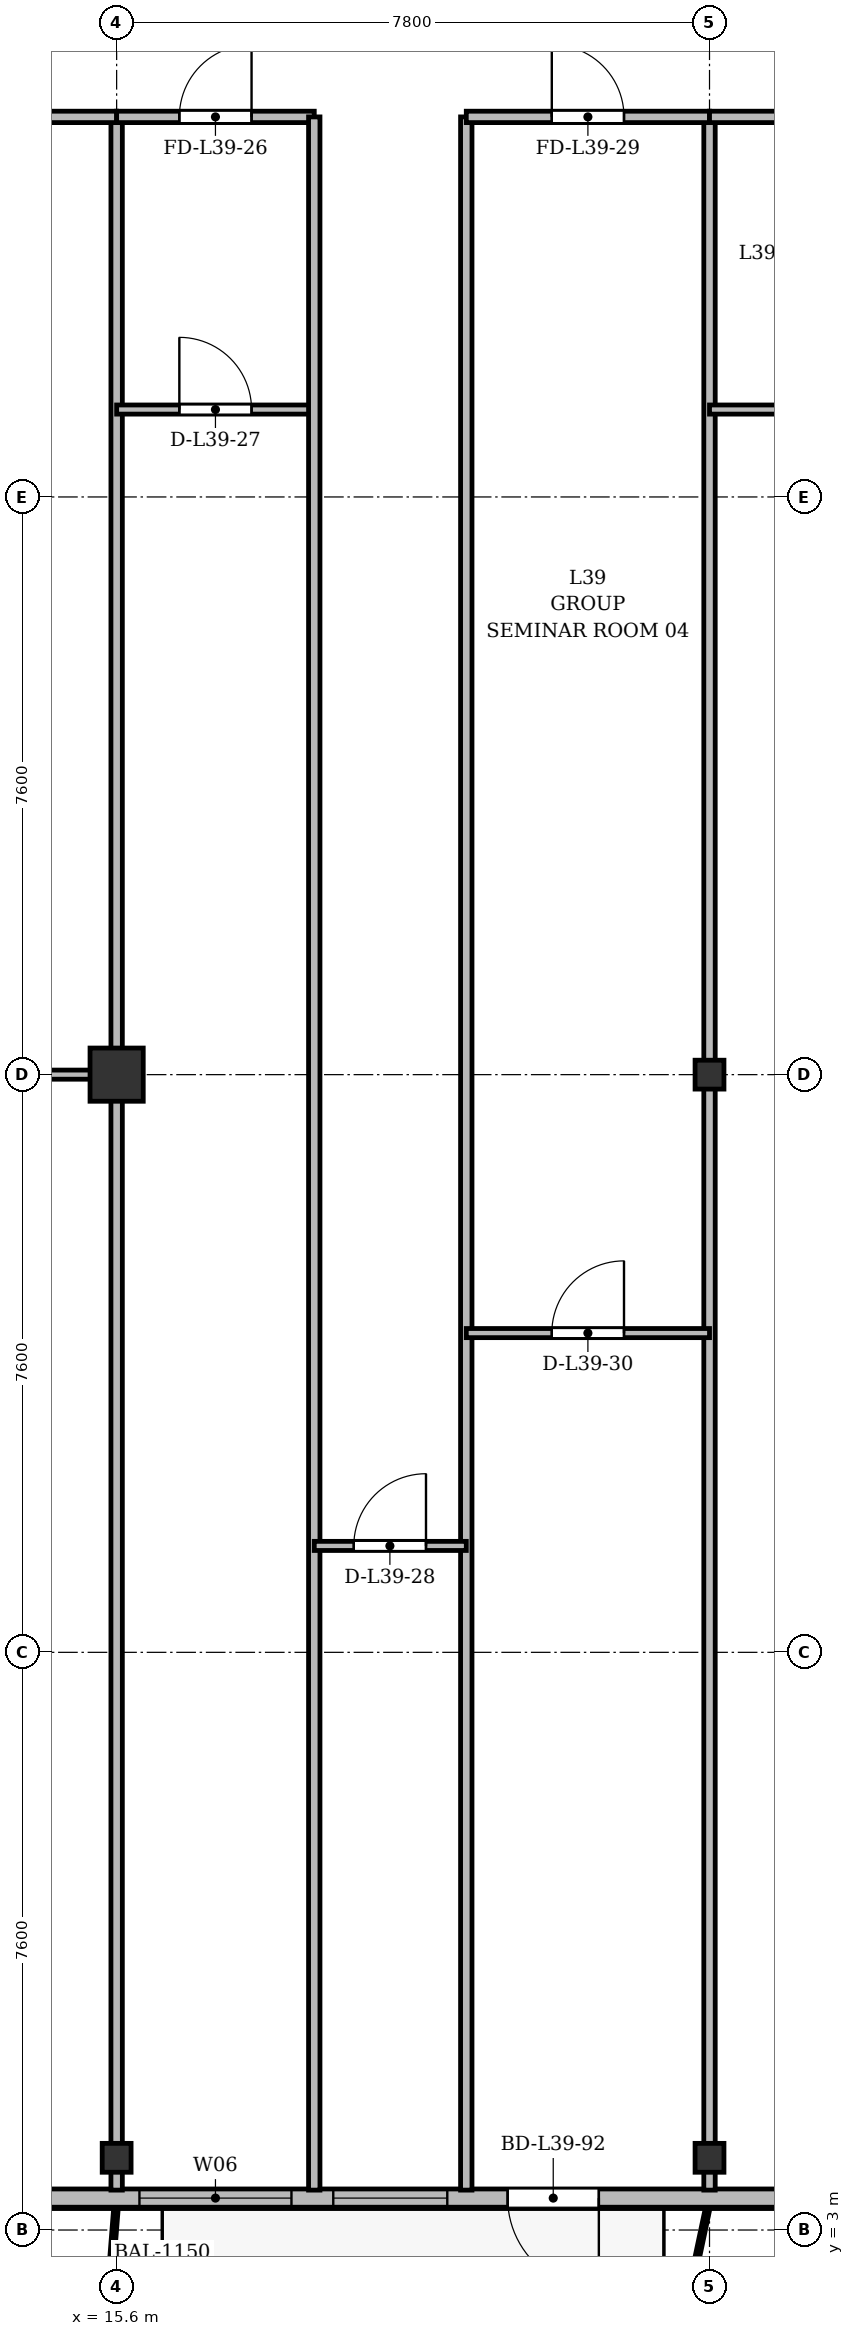
"""IFC4 building model, lengths in metres.
Left out: names, types, materials, properties, quantities, classifications, styles, units other than length and angle.
Written with IfcOpenShell. Run it as: python <this file> out.ifc"""

import sys

from ifc_helpers import new_model, si_unit, direction, frame, frame_2d, origin, origin_2d, place, context, subcontext, project, spatial, rectangle, i_section, extrude, source, transform, mapped, element, fill, save


model = new_model("IFC4")
c1 = context("Model", 3, precision=1e-05, world=origin(), true_north=direction((0.0, 1.0)))
c2 = subcontext(c1, "Body", "Model", "MODEL_VIEW")
j1 = project(units=[si_unit("LENGTHUNIT", "METRE"), si_unit("PLANEANGLEUNIT", "RADIAN")], contexts=[c1])
p1 = place(None, origin())
s1 = spatial("IfcSite", under=j1, at=p1, CompositionType="ELEMENT")
p2 = place(p1, origin())
s2 = spatial("IfcBuilding", under=s1, at=p2, CompositionType="ELEMENT")
p3 = place(p2, frame((0.0, 0.0, 150.1)))
s3 = spatial("IfcBuildingStorey", under=s2, at=p3, CompositionType="ELEMENT", Elevation=150.1)
m1 = source(origin(), c2, "Body", "SweptSolid", [
    extrude(i_section(OverallWidth=0.38, OverallDepth=0.38, WebThickness=0.02, FlangeThickness=0.03, at=origin_2d()), origin(), (0.0, 0.0, 1.0), 3.6),
])
p4 = place(p3, frame((15.6, 3.95, 0.0), z_axis=(0.0, 0.0, 1.0), x_axis=(1.0, 0.0, 0.0)))
e1 = element("IfcColumn", 1, at=p4, inside=s3, PredefinedType="COLUMN", context=c2, shape_type="MappedRepresentation", body=[
    mapped(m1, transform((0.0, 0.0, 0.0), x_axis=(1.0, 0.0, 0.0), y_axis=(0.0, 1.0, 0.0), z_axis=(0.0, 0.0, 1.0), scale=1.0)),
])
m2 = source(origin(), c2, "Body", "SweptSolid", [
    extrude(rectangle(XDim=0.7, YDim=0.7, at=origin_2d()), origin(), (0.0, 0.0, 1.0), 3.6),
])
p5 = place(p3, frame((15.6, 18.2, 0.0), z_axis=(0.0, 0.0, 1.0), x_axis=(1.0, 0.0, 0.0)))
e2 = element("IfcColumn", 2, at=p5, inside=s3, PredefinedType="COLUMN", context=c2, shape_type="MappedRepresentation", body=[
    mapped(m2, transform((0.0, 0.0, 0.0), x_axis=(1.0, 0.0, 0.0), y_axis=(0.0, 1.0, 0.0), z_axis=(0.0, 0.0, 1.0), scale=1.0)),
])
for number, where, z_axis, x_axis in (
    (3, (23.4, 3.95, 0.0), (0.0, 0.0, 1.0), (1.0, 0.0, 0.0)),
    (4, (23.4, 18.2, 0.0), (0.0, 0.0, 1.0), (1.0, 0.0, 0.0)),
):
    element("IfcColumn", number, at=place(p3, frame(where, z_axis=z_axis, x_axis=x_axis)), inside=s3, PredefinedType="COLUMN", context=c2, shape_type="MappedRepresentation", body=[
        mapped(m1, transform((0.0, 0.0, 0.0), x_axis=(1.0, 0.0, 0.0), y_axis=(0.0, 1.0, 0.0), z_axis=(0.0, 0.0, 1.0), scale=1.0)),
    ])
p6 = place(p3, frame((63.6, 3.42, 0.0), z_axis=(0.0, 0.0, 1.0), x_axis=(-1.0, 0.0, 0.0)))
e5 = element("IfcWall", 5, at=p6, inside=s3, PredefinedType="SOLIDWALL", context=c2, shape_type="SweptSolid", body=[
    extrude(rectangle(XDim=52.8, YDim=0.24, at=frame_2d((26.4, 0.0))), origin(), (0.0, 0.0, 1.0), 3.35),
])
p7 = place(p6, frame((1.62, 0.0, 0.9)))
e6 = element("IfcOpeningElement", 6, at=p7, cuts=e5, PredefinedType="OPENING", context=c2, shape_type="SweptSolid", body=[
    extrude(rectangle(XDim=1.65, YDim=1.85, at=frame_2d((0.825, 0.925))), frame((0.0, 0.13, 0.0), z_axis=(0.0, -1.0, 0.0), x_axis=(1.0, 0.0, 0.0)), (0.0, 0.0, 1.0), 0.26),
])
p8 = place(p6, frame((5.2, 0.0, 0.9)))
e7 = element("IfcOpeningElement", 7, at=p8, cuts=e5, PredefinedType="OPENING", context=c2, shape_type="SweptSolid", body=[
    extrude(rectangle(XDim=1.8, YDim=1.8, at=frame_2d((0.9, 0.9))), frame((0.0, 0.13, 0.0), z_axis=(0.0, -1.0, 0.0), x_axis=(1.0, 0.0, 0.0)), (0.0, 0.0, 1.0), 0.26),
])
p9 = place(p6, frame((7.65, 0.0, 0.9)))
e8 = element("IfcOpeningElement", 8, at=p9, cuts=e5, PredefinedType="OPENING", context=c2, shape_type="SweptSolid", body=[
    extrude(rectangle(XDim=1.5, YDim=1.75, at=frame_2d((0.75, 0.875))), frame((0.0, 0.13, 0.0), z_axis=(0.0, -1.0, 0.0), x_axis=(1.0, 0.0, 0.0)), (0.0, 0.0, 1.0), 0.26),
])
p10 = place(p6, frame((10.25, 0.0, 0.9)))
e9 = element("IfcOpeningElement", 9, at=p10, cuts=e5, PredefinedType="OPENING", context=c2, shape_type="SweptSolid", body=[
    extrude(rectangle(XDim=1.5, YDim=1.75, at=frame_2d((0.75, 0.875))), frame((0.0, 0.13, 0.0), z_axis=(0.0, -1.0, 0.0), x_axis=(1.0, 0.0, 0.0)), (0.0, 0.0, 1.0), 0.26),
])
p11 = place(p6, frame((14.417, 0.0, 0.0)))
e10 = element("IfcOpeningElement", 10, at=p11, cuts=e5, PredefinedType="OPENING", context=c2, shape_type="SweptSolid", body=[
    extrude(rectangle(XDim=1.2, YDim=2.2, at=frame_2d((0.6, 1.1))), frame((0.0, 0.13, 0.0), z_axis=(0.0, -1.0, 0.0), x_axis=(1.0, 0.0, 0.0)), (0.0, 0.0, 1.0), 0.26),
])
p12 = place(p6, frame((25.575, 0.0, 0.9)))
e11 = element("IfcOpeningElement", 11, at=p12, cuts=e5, PredefinedType="OPENING", context=c2, shape_type="SweptSolid", body=[
    extrude(rectangle(XDim=1.65, YDim=1.85, at=frame_2d((0.825, 0.925))), frame((0.0, 0.13, 0.0), z_axis=(0.0, -1.0, 0.0), x_axis=(1.0, 0.0, 0.0)), (0.0, 0.0, 1.0), 0.26),
])
p13 = place(p6, frame((35.7, 0.0, 0.9)))
e12 = element("IfcOpeningElement", 12, at=p13, cuts=e5, PredefinedType="OPENING", context=c2, shape_type="SweptSolid", body=[
    extrude(rectangle(XDim=1.8, YDim=1.8, at=frame_2d((0.9, 0.9))), frame((0.0, 0.13, 0.0), z_axis=(0.0, -1.0, 0.0), x_axis=(1.0, 0.0, 0.0)), (0.0, 0.0, 1.0), 0.26),
])
p14 = place(p6, frame((41.656, 0.0, 0.0)))
e13 = element("IfcOpeningElement", 13, at=p14, cuts=e5, PredefinedType="OPENING", context=c2, shape_type="SweptSolid", body=[
    extrude(rectangle(XDim=1.2, YDim=2.2, at=frame_2d((0.6, 1.1))), frame((0.0, 0.13, 0.0), z_axis=(0.0, -1.0, 0.0), x_axis=(1.0, 0.0, 0.0)), (0.0, 0.0, 1.0), 0.26),
])
p15 = place(p6, frame((43.65, 0.0, 0.9)))
e14 = element("IfcOpeningElement", 14, at=p15, cuts=e5, PredefinedType="OPENING", context=c2, shape_type="SweptSolid", body=[
    extrude(rectangle(XDim=1.5, YDim=1.75, at=frame_2d((0.75, 0.875))), frame((0.0, 0.13, 0.0), z_axis=(0.0, -1.0, 0.0), x_axis=(1.0, 0.0, 0.0)), (0.0, 0.0, 1.0), 0.26),
])
p16 = place(p6, frame((45.7, 0.0, 0.9)))
e15 = element("IfcOpeningElement", 15, at=p16, cuts=e5, PredefinedType="OPENING", context=c2, shape_type="SweptSolid", body=[
    extrude(rectangle(XDim=2.0, YDim=1.95, at=frame_2d((1.0, 0.975))), frame((0.0, 0.13, 0.0), z_axis=(0.0, -1.0, 0.0), x_axis=(1.0, 0.0, 0.0)), (0.0, 0.0, 1.0), 0.26),
])
p17 = place(p6, frame((49.53, 0.0, 0.9)))
e16 = element("IfcOpeningElement", 16, at=p17, cuts=e5, PredefinedType="OPENING", context=c2, shape_type="SweptSolid", body=[
    extrude(rectangle(XDim=1.65, YDim=1.85, at=frame_2d((0.825, 0.925))), frame((0.0, 0.13, 0.0), z_axis=(0.0, -1.0, 0.0), x_axis=(1.0, 0.0, 0.0)), (0.0, 0.0, 1.0), 0.26),
])
for number, where, z_axis, x_axis in (
    (17, (15.6, 3.525, 0.0), (0.0, 0.0, 1.0), (0.0, 1.0, 0.0)),
    (18, (23.4, 3.525, 0.0), (0.0, 0.0, 1.0), (0.0, 1.0, 0.0)),
):
    element("IfcWall", number, at=place(p3, frame(where, z_axis=z_axis, x_axis=x_axis)), inside=s3, PredefinedType="PARTITIONING", context=c2, shape_type="SweptSolid", body=[
        extrude(rectangle(XDim=27.275, YDim=0.15, at=frame_2d((13.638, 0.0))), origin(), (0.0, 0.0, 1.0), 2.85),
    ])
p18 = place(p3, frame((8.025, 30.8, 0.0), z_axis=(0.0, 0.0, 1.0), x_axis=(1.0, 0.0, 0.0)))
e19 = element("IfcWall", 19, at=p18, inside=s3, PredefinedType="PARTITIONING", context=c2, shape_type="SweptSolid", body=[
    extrude(rectangle(XDim=7.575, YDim=0.15, at=frame_2d((3.788, 0.0))), origin(), (0.0, 0.0, 1.0), 2.85),
])
p19 = place(p18, frame((3.312, 0.0, 0.0)))
e20 = element("IfcOpeningElement", 20, at=p19, cuts=e19, PredefinedType="OPENING", context=c2, shape_type="SweptSolid", body=[
    extrude(rectangle(XDim=0.95, YDim=2.15, at=frame_2d((0.475, 1.075))), frame((0.0, 0.085, 0.0), z_axis=(0.0, -1.0, 0.0), x_axis=(1.0, 0.0, 0.0)), (0.0, 0.0, 1.0), 0.17),
])
p20 = place(p3, frame((8.025, 18.2, 0.0), z_axis=(0.0, 0.0, 1.0), x_axis=(1.0, 0.0, 0.0)))
e21 = element("IfcWall", 21, at=p20, inside=s3, PredefinedType="PARTITIONING", context=c2, shape_type="SweptSolid", body=[
    extrude(rectangle(XDim=7.575, YDim=0.12, at=frame_2d((3.788, 0.0))), origin(), (0.0, 0.0, 1.0), 2.75),
])
p21 = place(p20, frame((3.312, 0.0, 0.0)))
e22 = element("IfcOpeningElement", 22, at=p21, cuts=e21, PredefinedType="OPENING", context=c2, shape_type="SweptSolid", body=[
    extrude(rectangle(XDim=0.95, YDim=2.15, at=frame_2d((0.475, 1.075))), frame((0.0, 0.07, 0.0), z_axis=(0.0, -1.0, 0.0), x_axis=(1.0, 0.0, 0.0)), (0.0, 0.0, 1.0), 0.14),
])
p22 = place(p3, frame((15.6, 30.8, 0.0), z_axis=(0.0, 0.0, 1.0), x_axis=(1.0, 0.0, 0.0)))
e23 = element("IfcWall", 23, at=p22, inside=s3, PredefinedType="PARTITIONING", context=c2, shape_type="SweptSolid", body=[
    extrude(rectangle(XDim=2.6, YDim=0.15, at=frame_2d((1.3, 0.0))), origin(), (0.0, 0.0, 1.0), 2.85),
])
p23 = place(p22, frame((0.825, 0.0, 0.0)))
e24 = element("IfcOpeningElement", 24, at=p23, cuts=e23, PredefinedType="OPENING", context=c2, shape_type="SweptSolid", body=[
    extrude(rectangle(XDim=0.95, YDim=2.15, at=frame_2d((0.475, 1.075))), frame((0.0, 0.085, 0.0), z_axis=(0.0, -1.0, 0.0), x_axis=(1.0, 0.0, 0.0)), (0.0, 0.0, 1.0), 0.17),
])
p24 = place(p3, frame((15.6, 26.95, 0.0), z_axis=(0.0, 0.0, 1.0), x_axis=(1.0, 0.0, 0.0)))
e25 = element("IfcWall", 25, at=p24, inside=s3, PredefinedType="PARTITIONING", context=c2, shape_type="SweptSolid", body=[
    extrude(rectangle(XDim=2.6, YDim=0.12, at=frame_2d((1.3, 0.0))), origin(), (0.0, 0.0, 1.0), 2.85),
])
p25 = place(p24, frame((0.825, 0.0, 0.0)))
e26 = element("IfcOpeningElement", 26, at=p25, cuts=e25, PredefinedType="OPENING", context=c2, shape_type="SweptSolid", body=[
    extrude(rectangle(XDim=0.95, YDim=2.15, at=frame_2d((0.475, 1.075))), frame((0.0, 0.07, 0.0), z_axis=(0.0, -1.0, 0.0), x_axis=(1.0, 0.0, 0.0)), (0.0, 0.0, 1.0), 0.14),
])
for number, where, z_axis, x_axis in (
    (27, (18.2, 3.525, 0.0), (0.0, 0.0, 1.0), (0.0, 1.0, 0.0)),
    (28, (20.2, 3.525, 0.0), (0.0, 0.0, 1.0), (0.0, 1.0, 0.0)),
):
    element("IfcWall", number, at=place(p3, frame(where, z_axis=z_axis, x_axis=x_axis)), inside=s3, PredefinedType="PARTITIONING", context=c2, shape_type="SweptSolid", body=[
        extrude(rectangle(XDim=27.275, YDim=0.15, at=frame_2d((13.638, 0.0))), origin(), (0.0, 0.0, 1.0), 2.75),
    ])
p26 = place(p3, frame((18.2, 12.0, 0.0), z_axis=(0.0, 0.0, 1.0), x_axis=(1.0, 0.0, 0.0)))
e29 = element("IfcWall", 29, at=p26, inside=s3, PredefinedType="PARTITIONING", context=c2, shape_type="SweptSolid", body=[
    extrude(rectangle(XDim=2.0, YDim=0.12, at=frame_2d((1.0, 0.0))), origin(), (0.0, 0.0, 1.0), 3.35),
])
p27 = place(p26, frame((0.52, 0.0, 0.0)))
e30 = element("IfcOpeningElement", 30, at=p27, cuts=e29, PredefinedType="OPENING", context=c2, shape_type="SweptSolid", body=[
    extrude(rectangle(XDim=0.95, YDim=2.15, at=frame_2d((0.475, 1.075))), frame((0.0, 0.07, 0.0), z_axis=(0.0, -1.0, 0.0), x_axis=(1.0, 0.0, 0.0)), (0.0, 0.0, 1.0), 0.14),
])
p28 = place(p3, frame((20.2, 30.8, 0.0), z_axis=(0.0, 0.0, 1.0), x_axis=(1.0, 0.0, 0.0)))
e31 = element("IfcWall", 31, at=p28, inside=s3, PredefinedType="PARTITIONING", context=c2, shape_type="SweptSolid", body=[
    extrude(rectangle(XDim=3.2, YDim=0.15, at=frame_2d((1.6, 0.0))), origin(), (0.0, 0.0, 1.0), 2.85),
])
p29 = place(p28, frame((1.125, 0.0, 0.0)))
e32 = element("IfcOpeningElement", 32, at=p29, cuts=e31, PredefinedType="OPENING", context=c2, shape_type="SweptSolid", body=[
    extrude(rectangle(XDim=0.95, YDim=2.15, at=frame_2d((0.475, 1.075))), frame((0.0, 0.085, 0.0), z_axis=(0.0, -1.0, 0.0), x_axis=(1.0, 0.0, 0.0)), (0.0, 0.0, 1.0), 0.17),
])
p30 = place(p3, frame((20.2, 14.8, 0.0), z_axis=(0.0, 0.0, 1.0), x_axis=(1.0, 0.0, 0.0)))
e33 = element("IfcWall", 33, at=p30, inside=s3, PredefinedType="PARTITIONING", context=c2, shape_type="SweptSolid", body=[
    extrude(rectangle(XDim=3.2, YDim=0.12, at=frame_2d((1.6, 0.0))), origin(), (0.0, 0.0, 1.0), 2.85),
])
p31 = place(p30, frame((1.125, 0.0, 0.0)))
e34 = element("IfcOpeningElement", 34, at=p31, cuts=e33, PredefinedType="OPENING", context=c2, shape_type="SweptSolid", body=[
    extrude(rectangle(XDim=0.95, YDim=2.15, at=frame_2d((0.475, 1.075))), frame((0.0, 0.07, 0.0), z_axis=(0.0, -1.0, 0.0), x_axis=(1.0, 0.0, 0.0)), (0.0, 0.0, 1.0), 0.14),
])
p32 = place(p3, frame((23.4, 30.8, 0.0), z_axis=(0.0, 0.0, 1.0), x_axis=(1.0, 0.0, 0.0)))
e35 = element("IfcWall", 35, at=p32, inside=s3, PredefinedType="PARTITIONING", context=c2, shape_type="SweptSolid", body=[
    extrude(rectangle(XDim=7.2, YDim=0.15, at=frame_2d((3.6, 0.0))), origin(), (0.0, 0.0, 1.0), 2.85),
])
p33 = place(p32, frame((3.125, 0.0, 0.0)))
e36 = element("IfcOpeningElement", 36, at=p33, cuts=e35, PredefinedType="OPENING", context=c2, shape_type="SweptSolid", body=[
    extrude(rectangle(XDim=0.95, YDim=2.15, at=frame_2d((0.475, 1.075))), frame((0.0, 0.085, 0.0), z_axis=(0.0, -1.0, 0.0), x_axis=(1.0, 0.0, 0.0)), (0.0, 0.0, 1.0), 0.17),
])
p34 = place(p3, frame((23.4, 26.95, 0.0), z_axis=(0.0, 0.0, 1.0), x_axis=(1.0, 0.0, 0.0)))
e37 = element("IfcWall", 37, at=p34, inside=s3, PredefinedType="PARTITIONING", context=c2, shape_type="SweptSolid", body=[
    extrude(rectangle(XDim=7.2, YDim=0.12, at=frame_2d((3.6, 0.0))), origin(), (0.0, 0.0, 1.0), 2.85),
])
p35 = place(p34, frame((3.125, 0.0, 0.0)))
e38 = element("IfcOpeningElement", 38, at=p35, cuts=e37, PredefinedType="OPENING", context=c2, shape_type="SweptSolid", body=[
    extrude(rectangle(XDim=0.95, YDim=2.15, at=frame_2d((0.475, 1.075))), frame((0.0, 0.07, 0.0), z_axis=(0.0, -1.0, 0.0), x_axis=(1.0, 0.0, 0.0)), (0.0, 0.0, 1.0), 0.14),
])
m3 = source(origin(), c2, "Body", "SweptSolid", [
    extrude(rectangle(XDim=1.2, YDim=2.2, at=frame_2d((0.6, 1.1))), frame((0.0, 0.025, 0.0), z_axis=(0.0, -1.0, 0.0), x_axis=(1.0, 0.0, 0.0)), (0.0, 0.0, 1.0), 0.05),
])
p36 = place(p14, origin())
e39 = element("IfcDoor", 39, at=p36, inside=s3, OperationType="SINGLE_SWING_LEFT", PredefinedType="DOOR", context=c2, shape_type="MappedRepresentation", body=[
    mapped(m3, transform((0.0, 0.0, 0.0), x_axis=(1.0, 0.0, 0.0), y_axis=(0.0, 1.0, 0.0), z_axis=(0.0, 0.0, 1.0), scale=1.0)),
])
fill(e13, e39)
m4 = source(origin(), c2, "Body", "SweptSolid", [
    extrude(rectangle(XDim=1.5, YDim=1.75, at=frame_2d((0.75, 0.875))), frame((0.0, 0.03, 0.0), z_axis=(0.0, -1.0, 0.0), x_axis=(1.0, 0.0, 0.0)), (0.0, 0.0, 1.0), 0.06),
])
p37 = place(p15, origin())
e40 = element("IfcWindow", 40, at=p37, inside=s3, PartitioningType="SINGLE_PANEL", PredefinedType="WINDOW", context=c2, shape_type="MappedRepresentation", body=[
    mapped(m4, transform((0.0, 0.0, 0.0), x_axis=(1.0, 0.0, 0.0), y_axis=(0.0, 1.0, 0.0), z_axis=(0.0, 0.0, 1.0), scale=1.0)),
])
fill(e14, e40)
m5 = source(origin(), c2, "Body", "SweptSolid", [
    extrude(rectangle(XDim=2.0, YDim=1.95, at=frame_2d((1.0, 0.975))), frame((0.0, 0.03, 0.0), z_axis=(0.0, -1.0, 0.0), x_axis=(1.0, 0.0, 0.0)), (0.0, 0.0, 1.0), 0.06),
])
p38 = place(p16, origin())
e41 = element("IfcWindow", 41, at=p38, inside=s3, PartitioningType="SINGLE_PANEL", PredefinedType="WINDOW", context=c2, shape_type="MappedRepresentation", body=[
    mapped(m5, transform((0.0, 0.0, 0.0), x_axis=(1.0, 0.0, 0.0), y_axis=(0.0, 1.0, 0.0), z_axis=(0.0, 0.0, 1.0), scale=1.0)),
])
fill(e15, e41)
m6 = source(origin(), c2, "Body", "SweptSolid", [
    extrude(rectangle(XDim=0.95, YDim=2.15, at=frame_2d((0.475, 1.075))), frame((0.0, 0.025, 0.0), z_axis=(0.0, -1.0, 0.0), x_axis=(1.0, 0.0, 0.0)), (0.0, 0.0, 1.0), 0.05),
])
p39 = place(p23, origin())
e42 = element("IfcDoor", 42, at=p39, inside=s3, OperationType="SINGLE_SWING_RIGHT", PredefinedType="DOOR", context=c2, shape_type="MappedRepresentation", body=[
    mapped(m6, transform((0.0, 0.0, 0.0), x_axis=(1.0, 0.0, 0.0), y_axis=(0.0, 1.0, 0.0), z_axis=(0.0, 0.0, 1.0), scale=1.0)),
])
fill(e24, e42)
p40 = place(p25, origin())
e43 = element("IfcDoor", 43, at=p40, inside=s3, OperationType="SINGLE_SWING_LEFT", PredefinedType="DOOR", context=c2, shape_type="MappedRepresentation", body=[
    mapped(m6, transform((0.0, 0.0, 0.0), x_axis=(1.0, 0.0, 0.0), y_axis=(0.0, 1.0, 0.0), z_axis=(0.0, 0.0, 1.0), scale=1.0)),
])
fill(e26, e43)
p41 = place(p27, origin())
e44 = element("IfcDoor", 44, at=p41, inside=s3, OperationType="SINGLE_SWING_RIGHT", PredefinedType="DOOR", context=c2, shape_type="MappedRepresentation", body=[
    mapped(m6, transform((0.0, 0.0, 0.0), x_axis=(1.0, 0.0, 0.0), y_axis=(0.0, 1.0, 0.0), z_axis=(0.0, 0.0, 1.0), scale=1.0)),
])
fill(e30, e44)
p42 = place(p29, origin())
e45 = element("IfcDoor", 45, at=p42, inside=s3, OperationType="SINGLE_SWING_LEFT", PredefinedType="DOOR", context=c2, shape_type="MappedRepresentation", body=[
    mapped(m6, transform((0.0, 0.0, 0.0), x_axis=(1.0, 0.0, 0.0), y_axis=(0.0, 1.0, 0.0), z_axis=(0.0, 0.0, 1.0), scale=1.0)),
])
fill(e32, e45)
p43 = place(p31, origin())
e46 = element("IfcDoor", 46, at=p43, inside=s3, OperationType="SINGLE_SWING_RIGHT", PredefinedType="DOOR", context=c2, shape_type="MappedRepresentation", body=[
    mapped(m6, transform((0.0, 0.0, 0.0), x_axis=(1.0, 0.0, 0.0), y_axis=(0.0, 1.0, 0.0), z_axis=(0.0, 0.0, 1.0), scale=1.0)),
])
fill(e34, e46)
save(model, sys.argv[1])
